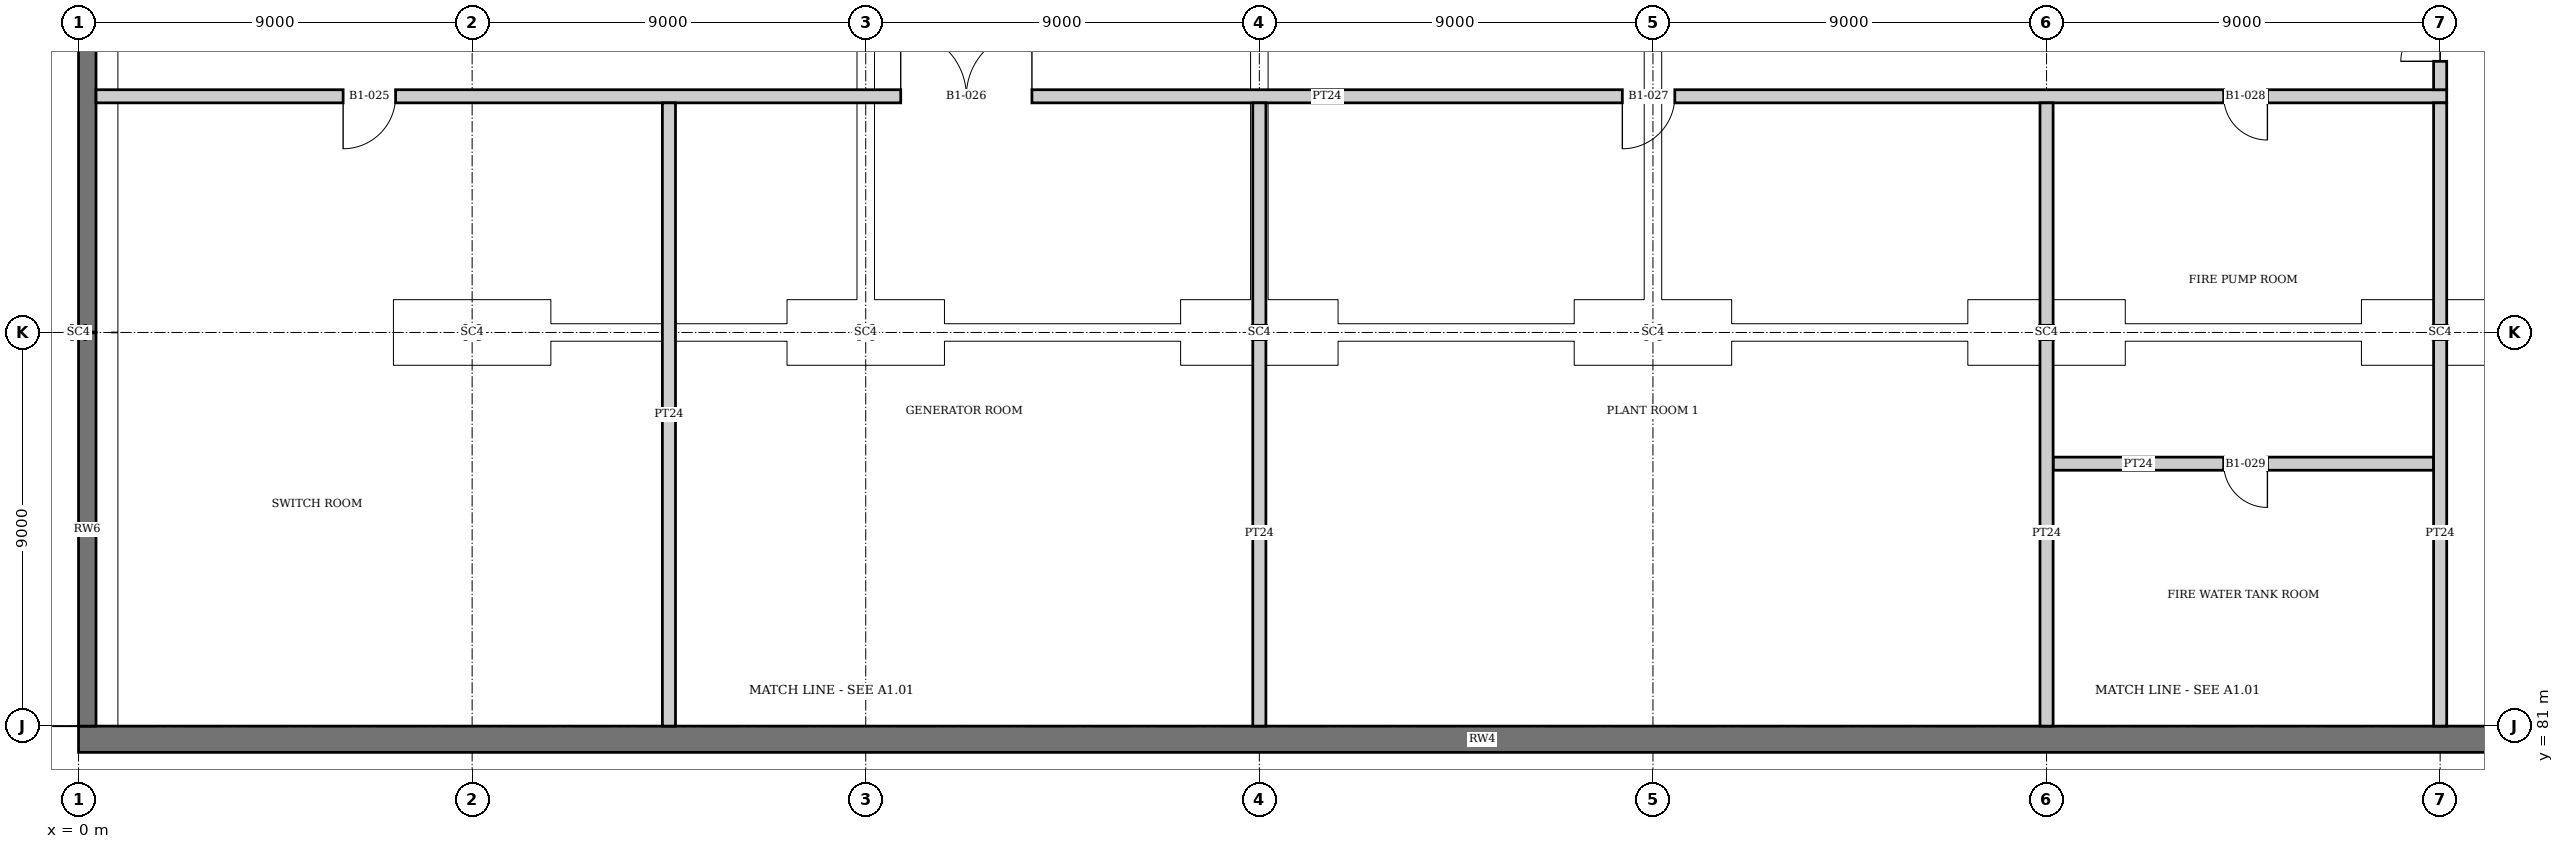
"""IFC4 building model, lengths in metres.
Left out: names, types, materials, properties, quantities, classifications, styles, units other than length and angle.
Written with IfcOpenShell. Run it as: python <this file> out.ifc"""

import sys

from ifc_helpers import new_model, si_unit, direction, frame, frame_2d, origin, origin_2d, place, context, subcontext, project, spatial, rectangle, i_section, extrude, element, fill, save


model = new_model("IFC4")
c1 = context("Model", 3, precision=1e-05, world=origin(), true_north=direction((0.0, 1.0)))
c2 = subcontext(c1, "Body", "Model", "MODEL_VIEW")
j1 = project(units=[si_unit("LENGTHUNIT", "METRE"), si_unit("PLANEANGLEUNIT", "RADIAN")], contexts=[c1])
p1 = place(None, origin())
s1 = spatial("IfcSite", under=j1, at=p1, CompositionType="ELEMENT")
p2 = place(p1, origin())
s2 = spatial("IfcBuilding", under=s1, at=p2, CompositionType="ELEMENT")
p3 = place(p2, frame((0.0, 0.0, -4.5)))
s3 = spatial("IfcBuildingStorey", under=s2, at=p3, CompositionType="ELEMENT", Elevation=-4.5)
for number, where, z_axis, x_axis in (
    (1, (0.0, 90.0, 0.0), (0.0, 0.0, 1.0), (0.0, 1.0, 0.0)),
    (2, (9.0, 90.0, 0.0), (0.0, 0.0, 1.0), (0.0, 1.0, 0.0)),
    (3, (18.0, 90.0, 0.0), (0.0, 0.0, 1.0), (0.0, 1.0, 0.0)),
    (4, (27.0, 90.0, 0.0), (0.0, 0.0, 1.0), (0.0, 1.0, 0.0)),
    (5, (36.0, 90.0, 0.0), (0.0, 0.0, 1.0), (0.0, 1.0, 0.0)),
    (6, (45.0, 90.0, 0.0), (0.0, 0.0, 1.0), (0.0, 1.0, 0.0)),
    (7, (54.0, 90.0, 0.0), (0.0, 0.0, 1.0), (0.0, 1.0, 0.0)),
):
    element("IfcColumn", number, at=place(p3, frame(where, z_axis=z_axis, x_axis=x_axis)), inside=s3, PredefinedType="COLUMN", context=c2, shape_type="SweptSolid", body=[
        extrude(i_section(OverallWidth=0.311, OverallDepth=0.327, WebThickness=0.016, FlangeThickness=0.025, at=origin_2d()), origin(), (0.0, 0.0, 1.0), 4.5),
    ])
p4 = place(p3, frame((0.0, 80.7, 0.0), z_axis=(0.0, 0.0, 1.0), x_axis=(1.0, 0.0, 0.0)))
e8 = element("IfcWall", 8, at=p4, inside=s3, PredefinedType="SHEAR", context=c2, shape_type="SweptSolid", body=[
    extrude(rectangle(XDim=180.0, YDim=0.6, at=frame_2d((90.0, 0.0))), origin(), (0.0, 0.0, 1.0), 4.5),
])
for number, where, z_axis, x_axis in (
    (9, (0.2, 81.0, 0.0), (0.0, 0.0, 1.0), (0.0, 1.0, 0.0)),
    (10, (0.2, 90.008, 0.0), (0.0, 0.0, 1.0), (0.0, 1.0, 0.0)),
):
    element("IfcWall", number, at=place(p3, frame(where, z_axis=z_axis, x_axis=x_axis)), inside=s3, PredefinedType="SOLIDWALL", context=c2, shape_type="SweptSolid", body=[
        extrude(rectangle(XDim=8.992, YDim=0.4, at=frame_2d((4.496, 0.0))), origin(), (0.0, 0.0, 1.0), 4.5),
    ])
p5 = place(p3, frame((45.15, 87.0, 0.0), z_axis=(0.0, 0.0, 1.0), x_axis=(1.0, 0.0, 0.0)))
e11 = element("IfcWall", 11, at=p5, inside=s3, PredefinedType="PARTITIONING", context=c2, shape_type="SweptSolid", body=[
    extrude(rectangle(XDim=8.7, YDim=0.3, at=frame_2d((4.35, 0.0))), origin(), (0.0, 0.0, 1.0), 3.79),
])
p6 = place(p5, frame((3.9, 0.0, 0.0)))
e12 = element("IfcOpeningElement", 12, at=p6, cuts=e11, PredefinedType="OPENING", context=c2, shape_type="SweptSolid", body=[
    extrude(rectangle(XDim=1.0, YDim=2.1, at=frame_2d((0.5, 1.05))), frame((0.0, 0.16, 0.0), z_axis=(0.0, -1.0, 0.0), x_axis=(1.0, 0.0, 0.0)), (0.0, 0.0, 1.0), 0.32),
])
p7 = place(p3, frame((0.4, 95.4, 0.0), z_axis=(0.0, 0.0, 1.0), x_axis=(1.0, 0.0, 0.0)))
e13 = element("IfcWall", 13, at=p7, inside=s3, PredefinedType="PARTITIONING", context=c2, shape_type="SweptSolid", body=[
    extrude(rectangle(XDim=53.75, YDim=0.3, at=frame_2d((26.875, 0.0))), origin(), (0.0, 0.0, 1.0), 3.79),
])
p8 = place(p7, frame((5.65, 0.0, 0.0)))
e14 = element("IfcOpeningElement", 14, at=p8, cuts=e13, PredefinedType="OPENING", context=c2, shape_type="SweptSolid", body=[
    extrude(rectangle(XDim=1.2, YDim=2.4, at=frame_2d((0.6, 1.2))), frame((0.0, 0.16, 0.0), z_axis=(0.0, -1.0, 0.0), x_axis=(1.0, 0.0, 0.0)), (0.0, 0.0, 1.0), 0.32),
])
p9 = place(p7, frame((18.4, 0.0, 0.0)))
e15 = element("IfcOpeningElement", 15, at=p9, cuts=e13, PredefinedType="OPENING", context=c2, shape_type="SweptSolid", body=[
    extrude(rectangle(XDim=3.0, YDim=2.4, at=frame_2d((1.5, 1.2))), frame((0.0, 0.16, 0.0), z_axis=(0.0, -1.0, 0.0), x_axis=(1.0, 0.0, 0.0)), (0.0, 0.0, 1.0), 0.32),
])
p10 = place(p7, frame((34.9, 0.0, 0.0)))
e16 = element("IfcOpeningElement", 16, at=p10, cuts=e13, PredefinedType="OPENING", context=c2, shape_type="SweptSolid", body=[
    extrude(rectangle(XDim=1.2, YDim=2.4, at=frame_2d((0.6, 1.2))), frame((0.0, 0.16, 0.0), z_axis=(0.0, -1.0, 0.0), x_axis=(1.0, 0.0, 0.0)), (0.0, 0.0, 1.0), 0.32),
])
p11 = place(p7, frame((48.65, 0.0, 0.0)))
e17 = element("IfcOpeningElement", 17, at=p11, cuts=e13, PredefinedType="OPENING", context=c2, shape_type="SweptSolid", body=[
    extrude(rectangle(XDim=1.0, YDim=2.4, at=frame_2d((0.5, 1.2))), frame((0.0, 0.16, 0.0), z_axis=(0.0, -1.0, 0.0), x_axis=(1.0, 0.0, 0.0)), (0.0, 0.0, 1.0), 0.32),
])
p12 = place(p3, frame((13.5, 81.0, 0.0), z_axis=(0.0, 0.0, 1.0), x_axis=(0.0, 1.0, 0.0)))
e18 = element("IfcWall", 18, at=p12, inside=s3, PredefinedType="PARTITIONING", context=c2, shape_type="SweptSolid", body=[
    extrude(rectangle(XDim=14.25, YDim=0.3, at=frame_2d((7.125, 0.0))), origin(), (0.0, 0.0, 1.0), 3.638),
])
p13 = place(p3, frame((27.0, 81.0, 0.0), z_axis=(0.0, 0.0, 1.0), x_axis=(0.0, 1.0, 0.0)))
e19 = element("IfcWall", 19, at=p13, inside=s3, PredefinedType="PARTITIONING", context=c2, shape_type="SweptSolid", body=[
    extrude(rectangle(XDim=8.836, YDim=0.3, at=frame_2d((4.418, 0.0))), origin(), (0.0, 0.0, 1.0), 3.79),
])
p14 = place(p3, frame((27.0, 90.164, 0.0), z_axis=(0.0, 0.0, 1.0), x_axis=(0.0, 1.0, 0.0)))
e20 = element("IfcWall", 20, at=p14, inside=s3, PredefinedType="PARTITIONING", context=c2, shape_type="SweptSolid", body=[
    extrude(rectangle(XDim=5.086, YDim=0.3, at=frame_2d((2.543, 0.0))), origin(), (0.0, 0.0, 1.0), 3.79),
])
p15 = place(p3, frame((45.0, 81.0, 0.0), z_axis=(0.0, 0.0, 1.0), x_axis=(0.0, 1.0, 0.0)))
e21 = element("IfcWall", 21, at=p15, inside=s3, PredefinedType="PARTITIONING", context=c2, shape_type="SweptSolid", body=[
    extrude(rectangle(XDim=8.836, YDim=0.3, at=frame_2d((4.418, 0.0))), origin(), (0.0, 0.0, 1.0), 3.79),
])
p16 = place(p3, frame((45.0, 90.164, 0.0), z_axis=(0.0, 0.0, 1.0), x_axis=(0.0, 1.0, 0.0)))
e22 = element("IfcWall", 22, at=p16, inside=s3, PredefinedType="PARTITIONING", context=c2, shape_type="SweptSolid", body=[
    extrude(rectangle(XDim=5.086, YDim=0.3, at=frame_2d((2.543, 0.0))), origin(), (0.0, 0.0, 1.0), 3.79),
])
p17 = place(p3, frame((54.0, 81.0, 0.0), z_axis=(0.0, 0.0, 1.0), x_axis=(0.0, 1.0, 0.0)))
e23 = element("IfcWall", 23, at=p17, inside=s3, PredefinedType="PARTITIONING", context=c2, shape_type="SweptSolid", body=[
    extrude(rectangle(XDim=8.836, YDim=0.3, at=frame_2d((4.418, 0.0))), origin(), (0.0, 0.0, 1.0), 3.79),
])
p18 = place(p3, frame((54.0, 90.164, 0.0), z_axis=(0.0, 0.0, 1.0), x_axis=(0.0, 1.0, 0.0)))
e24 = element("IfcWall", 24, at=p18, inside=s3, PredefinedType="PARTITIONING", context=c2, shape_type="SweptSolid", body=[
    extrude(rectangle(XDim=5.086, YDim=0.3, at=frame_2d((2.543, 0.0))), origin(), (0.0, 0.0, 1.0), 3.79),
])
p19 = place(p3, frame((54.0, 95.55, 0.0), z_axis=(0.0, 0.0, 1.0), x_axis=(0.0, 1.0, 0.0)))
e25 = element("IfcWall", 25, at=p19, inside=s3, PredefinedType="PARTITIONING", context=c2, shape_type="SweptSolid", body=[
    extrude(rectangle(XDim=3.45, YDim=0.3, at=frame_2d((1.725, 0.0))), origin(), (0.0, 0.0, 1.0), 3.638),
])
p20 = place(p19, frame((0.65, 0.0, 0.0)))
e26 = element("IfcOpeningElement", 26, at=p20, cuts=e25, PredefinedType="OPENING", context=c2, shape_type="SweptSolid", body=[
    extrude(rectangle(XDim=1.8, YDim=2.1, at=frame_2d((0.9, 1.05))), frame((0.0, 0.16, 0.0), z_axis=(0.0, -1.0, 0.0), x_axis=(1.0, 0.0, 0.0)), (0.0, 0.0, 1.0), 0.32),
])
p21 = place(p8, frame((1.2, 0.0, 0.0), z_axis=(0.0, 0.0, 1.0), x_axis=(-1.0, 0.0, 0.0)))
e27 = element("IfcDoor", 27, at=p21, inside=s3, OperationType="SINGLE_SWING_RIGHT", PredefinedType="DOOR", context=c2, shape_type="SweptSolid", body=[
    extrude(rectangle(XDim=1.2, YDim=2.4, at=frame_2d((0.6, 1.2))), frame((0.0, 0.025, 0.0), z_axis=(0.0, -1.0, 0.0), x_axis=(1.0, 0.0, 0.0)), (0.0, 0.0, 1.0), 0.05),
])
fill(e14, e27)
p22 = place(p9, origin())
e28 = element("IfcDoor", 28, at=p22, inside=s3, OperationType="DOUBLE_DOOR_SINGLE_SWING", PredefinedType="DOOR", context=c2, shape_type="SweptSolid", body=[
    extrude(rectangle(XDim=3.0, YDim=2.4, at=frame_2d((1.5, 1.2))), frame((0.0, 0.025, 0.0), z_axis=(0.0, -1.0, 0.0), x_axis=(1.0, 0.0, 0.0)), (0.0, 0.0, 1.0), 0.05),
])
fill(e15, e28)
p23 = place(p10, frame((1.2, 0.0, 0.0), z_axis=(0.0, 0.0, 1.0), x_axis=(-1.0, 0.0, 0.0)))
e29 = element("IfcDoor", 29, at=p23, inside=s3, OperationType="SINGLE_SWING_RIGHT", PredefinedType="DOOR", context=c2, shape_type="SweptSolid", body=[
    extrude(rectangle(XDim=1.2, YDim=2.4, at=frame_2d((0.6, 1.2))), frame((0.0, 0.025, 0.0), z_axis=(0.0, -1.0, 0.0), x_axis=(1.0, 0.0, 0.0)), (0.0, 0.0, 1.0), 0.05),
])
fill(e16, e29)
p24 = place(p11, frame((1.0, 0.0, 0.0), z_axis=(0.0, 0.0, 1.0), x_axis=(-1.0, 0.0, 0.0)))
e30 = element("IfcDoor", 30, at=p24, inside=s3, OperationType="SINGLE_SWING_LEFT", PredefinedType="DOOR", context=c2, shape_type="SweptSolid", body=[
    extrude(rectangle(XDim=1.0, YDim=2.4, at=frame_2d((0.5, 1.2))), frame((0.0, 0.025, 0.0), z_axis=(0.0, -1.0, 0.0), x_axis=(1.0, 0.0, 0.0)), (0.0, 0.0, 1.0), 0.05),
])
fill(e17, e30)
p25 = place(p6, frame((1.0, 0.0, 0.0), z_axis=(0.0, 0.0, 1.0), x_axis=(-1.0, 0.0, 0.0)))
e31 = element("IfcDoor", 31, at=p25, inside=s3, OperationType="SINGLE_SWING_LEFT", PredefinedType="DOOR", context=c2, shape_type="SweptSolid", body=[
    extrude(rectangle(XDim=1.0, YDim=2.1, at=frame_2d((0.5, 1.05))), frame((0.0, 0.025, 0.0), z_axis=(0.0, -1.0, 0.0), x_axis=(1.0, 0.0, 0.0)), (0.0, 0.0, 1.0), 0.05),
])
fill(e12, e31)
p26 = place(p20, origin())
e32 = element("IfcDoor", 32, at=p26, inside=s3, OperationType="DOUBLE_DOOR_SINGLE_SWING", PredefinedType="DOOR", context=c2, shape_type="SweptSolid", body=[
    extrude(rectangle(XDim=1.8, YDim=2.1, at=frame_2d((0.9, 1.05))), frame((0.0, 0.025, 0.0), z_axis=(0.0, -1.0, 0.0), x_axis=(1.0, 0.0, 0.0)), (0.0, 0.0, 1.0), 0.05),
])
fill(e26, e32)
save(model, sys.argv[1])
